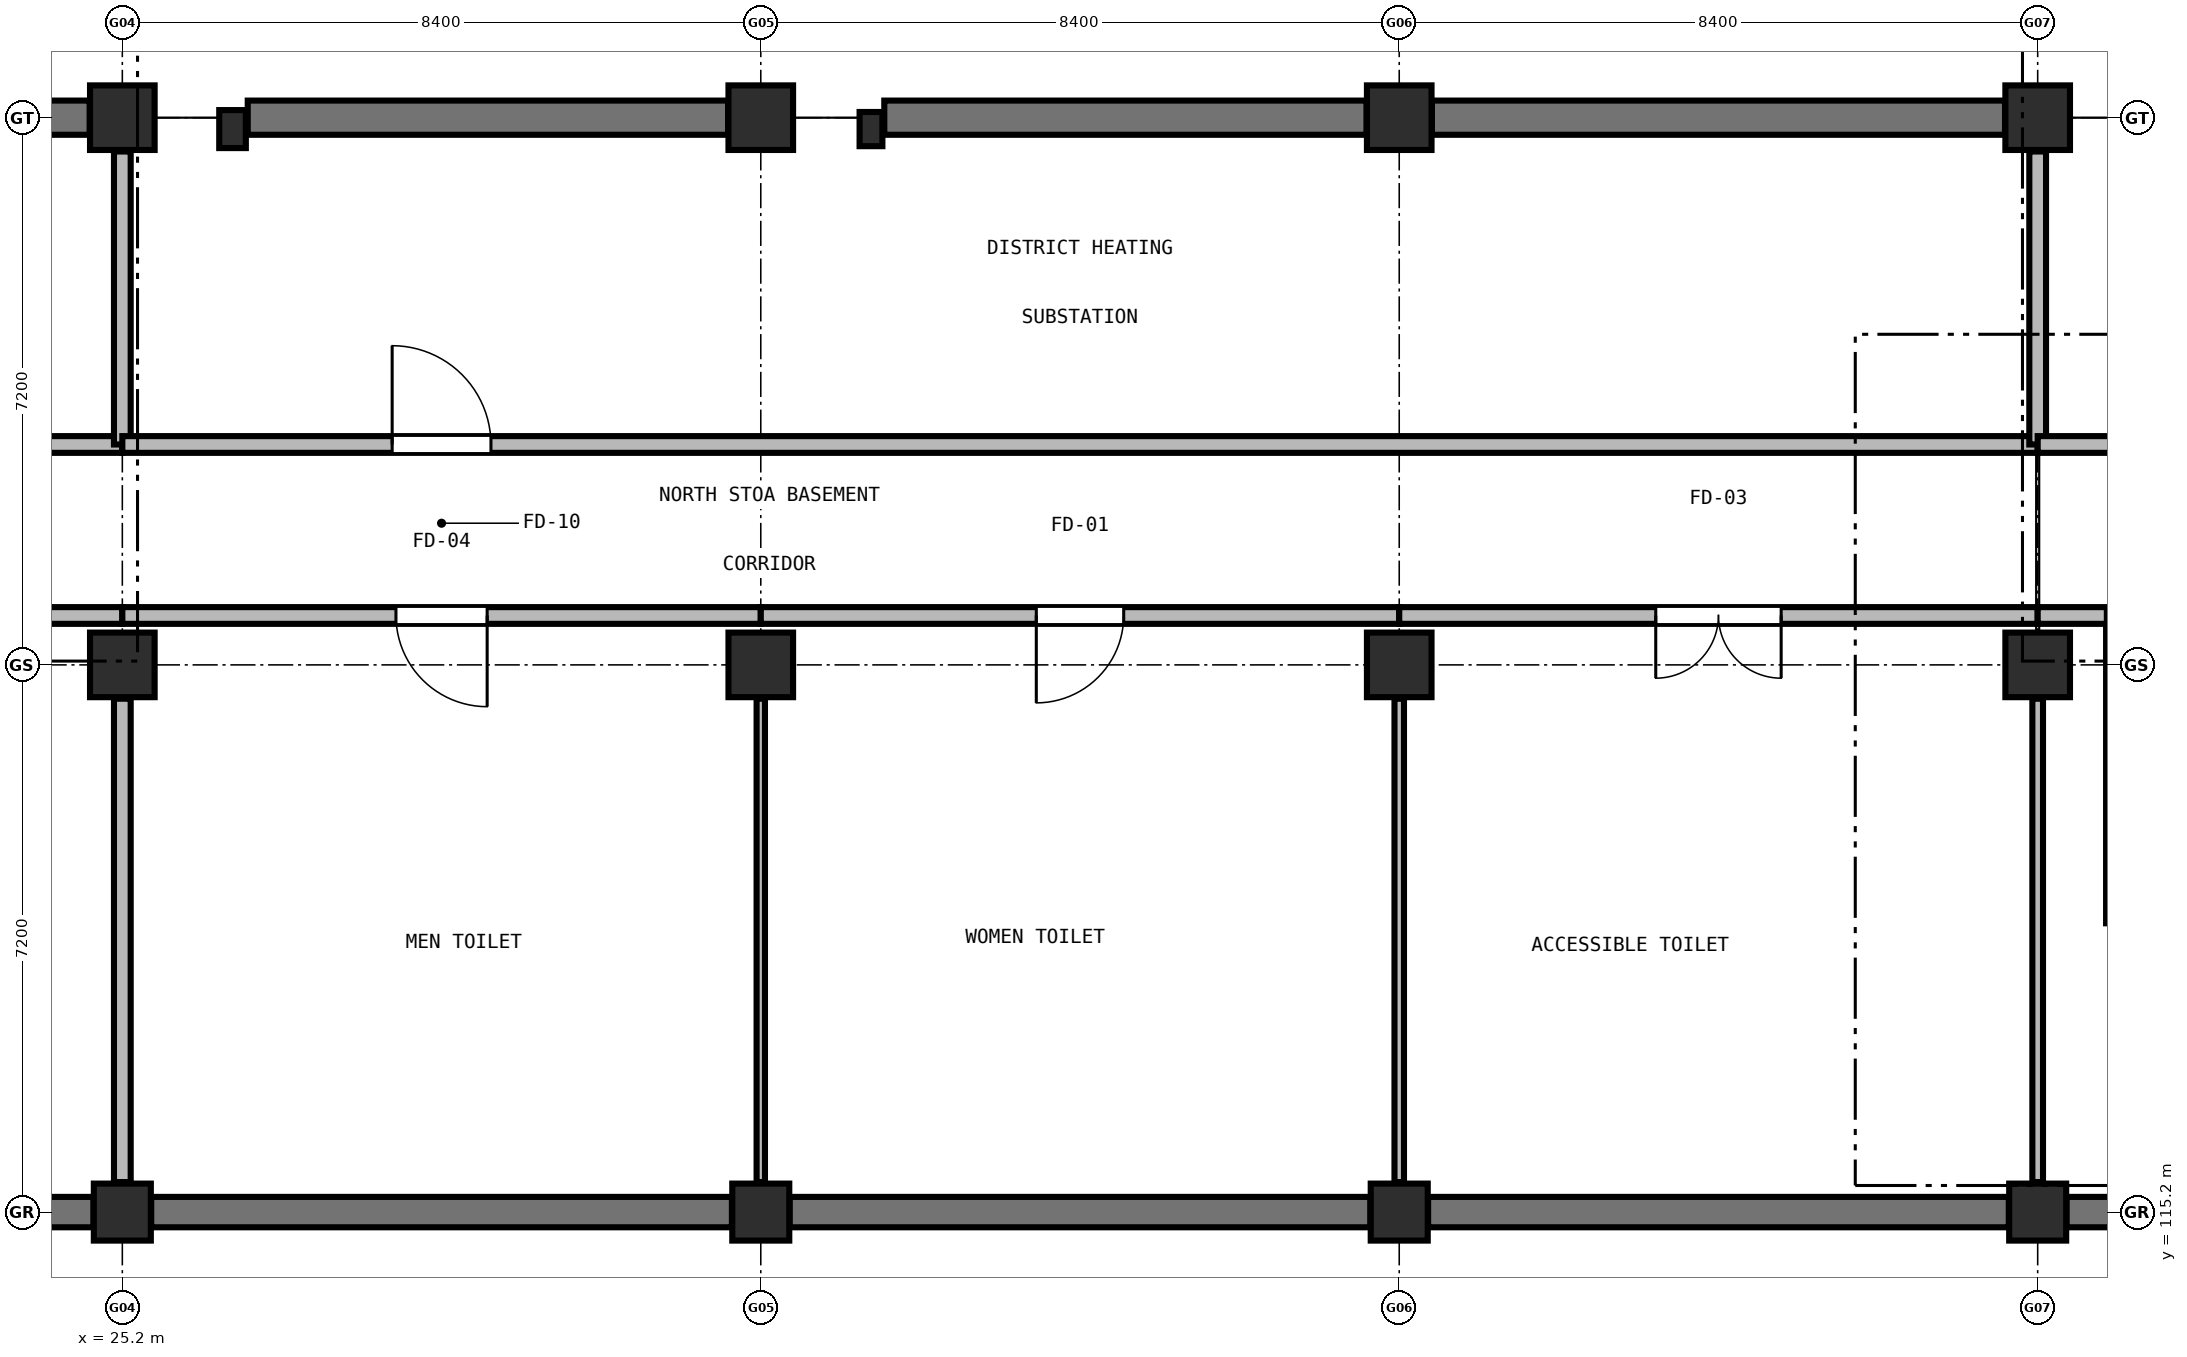
"""IFC4 building model, lengths in metres.
Left out: names, types, materials, properties, quantities, classifications, styles, units other than length and angle.
Written with IfcOpenShell. Run it as: python <this file> out.ifc"""

import sys

from ifc_helpers import new_model, si_unit, direction, frame, frame_2d, origin, origin_2d, place, context, subcontext, project, spatial, rectangle, extrude, element, fill, save


model = new_model("IFC4")
c1 = context("Model", 3, precision=1e-05, world=origin(), true_north=direction((0.0, 1.0)))
c2 = subcontext(c1, "Body", "Model", "MODEL_VIEW")
j1 = project(units=[si_unit("LENGTHUNIT", "METRE"), si_unit("PLANEANGLEUNIT", "RADIAN")], contexts=[c1])
p1 = place(None, origin())
s1 = spatial("IfcSite", under=j1, at=p1, CompositionType="ELEMENT")
p2 = place(p1, origin())
s2 = spatial("IfcBuilding", under=s1, at=p2, CompositionType="ELEMENT")
p3 = place(p2, frame((0.0, 0.0, -4.8)))
s3 = spatial("IfcBuildingStorey", under=s2, at=p3, CompositionType="ELEMENT", Elevation=-4.8)
p4 = place(p3, frame((25.2, 115.2, 0.0), z_axis=(0.0, 0.0, 1.0), x_axis=(1.0, 0.0, 0.0)))
e1 = element("IfcColumn", 1, at=p4, inside=s3, PredefinedType="COLUMN", context=c2, shape_type="SweptSolid", body=[
    extrude(rectangle(XDim=0.75, YDim=0.75, at=origin_2d()), origin(), (0.0, 0.0, 1.0), 4.8),
])
for number, where, z_axis, x_axis in (
    (2, (25.2, 122.4, 0.0), (0.0, 0.0, 1.0), (1.0, 0.0, 0.0)),
    (3, (25.2, 129.6, 0.0), (0.0, 0.0, 1.0), (1.0, 0.0, 0.0)),
):
    element("IfcColumn", number, at=place(p3, frame(where, z_axis=z_axis, x_axis=x_axis)), inside=s3, PredefinedType="COLUMN", context=c2, shape_type="SweptSolid", body=[
        extrude(rectangle(XDim=0.85, YDim=0.85, at=origin_2d()), origin(), (0.0, 0.0, 1.0), 4.8),
    ])
p5 = place(p3, frame((33.6, 115.2, 0.0), z_axis=(0.0, 0.0, 1.0), x_axis=(1.0, 0.0, 0.0)))
e4 = element("IfcColumn", 4, at=p5, inside=s3, PredefinedType="COLUMN", context=c2, shape_type="SweptSolid", body=[
    extrude(rectangle(XDim=0.75, YDim=0.75, at=origin_2d()), origin(), (0.0, 0.0, 1.0), 4.8),
])
for number, where, z_axis, x_axis in (
    (5, (33.6, 122.4, 0.0), (0.0, 0.0, 1.0), (1.0, 0.0, 0.0)),
    (6, (33.6, 129.6, 0.0), (0.0, 0.0, 1.0), (1.0, 0.0, 0.0)),
):
    element("IfcColumn", number, at=place(p3, frame(where, z_axis=z_axis, x_axis=x_axis)), inside=s3, PredefinedType="COLUMN", context=c2, shape_type="SweptSolid", body=[
        extrude(rectangle(XDim=0.85, YDim=0.85, at=origin_2d()), origin(), (0.0, 0.0, 1.0), 4.8),
    ])
p6 = place(p3, frame((42.0, 115.2, 0.0), z_axis=(0.0, 0.0, 1.0), x_axis=(1.0, 0.0, 0.0)))
e7 = element("IfcColumn", 7, at=p6, inside=s3, PredefinedType="COLUMN", context=c2, shape_type="SweptSolid", body=[
    extrude(rectangle(XDim=0.75, YDim=0.75, at=origin_2d()), origin(), (0.0, 0.0, 1.0), 4.8),
])
for number, where, z_axis, x_axis in (
    (8, (42.0, 122.4, 0.0), (0.0, 0.0, 1.0), (1.0, 0.0, 0.0)),
    (9, (42.0, 129.6, 0.0), (0.0, 0.0, 1.0), (1.0, 0.0, 0.0)),
):
    element("IfcColumn", number, at=place(p3, frame(where, z_axis=z_axis, x_axis=x_axis)), inside=s3, PredefinedType="COLUMN", context=c2, shape_type="SweptSolid", body=[
        extrude(rectangle(XDim=0.85, YDim=0.85, at=origin_2d()), origin(), (0.0, 0.0, 1.0), 4.8),
    ])
p7 = place(p3, frame((50.4, 115.2, 0.0), z_axis=(0.0, 0.0, 1.0), x_axis=(1.0, 0.0, 0.0)))
e10 = element("IfcColumn", 10, at=p7, inside=s3, PredefinedType="COLUMN", context=c2, shape_type="SweptSolid", body=[
    extrude(rectangle(XDim=0.75, YDim=0.75, at=origin_2d()), origin(), (0.0, 0.0, 1.0), 4.8),
])
for number, where, z_axis, x_axis in (
    (11, (50.4, 122.4, 0.0), (0.0, 0.0, 1.0), (1.0, 0.0, 0.0)),
    (12, (50.4, 129.6, 0.0), (0.0, 0.0, 1.0), (1.0, 0.0, 0.0)),
):
    element("IfcColumn", number, at=place(p3, frame(where, z_axis=z_axis, x_axis=x_axis)), inside=s3, PredefinedType="COLUMN", context=c2, shape_type="SweptSolid", body=[
        extrude(rectangle(XDim=0.85, YDim=0.85, at=origin_2d()), origin(), (0.0, 0.0, 1.0), 4.8),
    ])
p8 = place(p3, frame((26.65, 129.45, 0.0), z_axis=(0.0, 0.0, 1.0), x_axis=(1.0, 0.0, 0.0)))
e13 = element("IfcColumn", 13, at=p8, inside=s3, PredefinedType="PILASTER", context=c2, shape_type="SweptSolid", body=[
    extrude(rectangle(XDim=0.35, YDim=0.5, at=origin_2d()), origin(), (0.0, 0.0, 1.0), 3.85),
])
p9 = place(p3, frame((35.05, 129.45, 0.0), z_axis=(0.0, 0.0, 1.0), x_axis=(1.0, 0.0, 0.0)))
e14 = element("IfcColumn", 14, at=p9, inside=s3, PredefinedType="PILASTER", context=c2, shape_type="SweptSolid", body=[
    extrude(rectangle(XDim=0.3, YDim=0.45, at=origin_2d()), origin(), (0.0, 0.0, 1.0), 3.85),
])
p10 = place(p3, frame((17.23, 129.6, 0.0), z_axis=(0.0, 0.0, 1.0), x_axis=(1.0, 0.0, 0.0)))
e15 = element("IfcWall", 15, at=p10, inside=s3, PredefinedType="SHEAR", context=c2, shape_type="SweptSolid", body=[
    extrude(rectangle(XDim=7.54, YDim=0.45, at=frame_2d((3.77, 0.0))), origin(), (0.0, 0.0, 1.0), 3.64),
])
p11 = place(p3, frame((26.85, 129.6, 0.0), z_axis=(0.0, 0.0, 1.0), x_axis=(1.0, 0.0, 0.0)))
e16 = element("IfcWall", 16, at=p11, inside=s3, PredefinedType="SHEAR", context=c2, shape_type="SweptSolid", body=[
    extrude(rectangle(XDim=6.32, YDim=0.45, at=frame_2d((3.16, 0.0))), origin(), (0.0, 0.0, 1.0), 3.64),
])
p12 = place(p3, frame((35.225, 129.6, 0.0), z_axis=(0.0, 0.0, 1.0), x_axis=(1.0, 0.0, 0.0)))
e17 = element("IfcWall", 17, at=p12, inside=s3, PredefinedType="SHEAR", context=c2, shape_type="SweptSolid", body=[
    extrude(rectangle(XDim=6.345, YDim=0.45, at=frame_2d((3.172, 0.0))), origin(), (0.0, 0.0, 1.0), 3.64),
])
p13 = place(p3, frame((42.43, 129.6, 0.0), z_axis=(0.0, 0.0, 1.0), x_axis=(1.0, 0.0, 0.0)))
e18 = element("IfcWall", 18, at=p13, inside=s3, PredefinedType="SHEAR", context=c2, shape_type="SweptSolid", body=[
    extrude(rectangle(XDim=7.54, YDim=0.45, at=frame_2d((3.77, 0.0))), origin(), (0.0, 0.0, 1.0), 3.64),
])
p14 = place(p3, frame((17.18, 115.2, 0.0), z_axis=(0.0, 0.0, 1.0), x_axis=(1.0, 0.0, 0.0)))
e19 = element("IfcWall", 19, at=p14, inside=s3, PredefinedType="SHEAR", context=c2, shape_type="SweptSolid", body=[
    extrude(rectangle(XDim=7.64, YDim=0.4, at=frame_2d((3.82, 0.0))), origin(), (0.0, 0.0, 1.0), 3.64),
])
p15 = place(p3, frame((25.58, 115.2, 0.0), z_axis=(0.0, 0.0, 1.0), x_axis=(1.0, 0.0, 0.0)))
e20 = element("IfcWall", 20, at=p15, inside=s3, PredefinedType="SHEAR", context=c2, shape_type="SweptSolid", body=[
    extrude(rectangle(XDim=7.64, YDim=0.4, at=frame_2d((3.82, 0.0))), origin(), (0.0, 0.0, 1.0), 3.64),
])
for number, where, z_axis, x_axis in (
    (21, (33.98, 115.2, 0.0), (0.0, 0.0, 1.0), (1.0, 0.0, 0.0)),
    (22, (42.38, 115.2, 0.0), (0.0, 0.0, 1.0), (1.0, 0.0, 0.0)),
):
    element("IfcWall", number, at=place(p3, frame(where, z_axis=z_axis, x_axis=x_axis)), inside=s3, PredefinedType="SHEAR", context=c2, shape_type="SweptSolid", body=[
        extrude(rectangle(XDim=7.64, YDim=0.4, at=frame_2d((3.82, 0.0))), origin(), (0.0, 0.0, 1.0), 3.64),
    ])
p16 = place(p3, frame((50.78, 115.2, 0.0), z_axis=(0.0, 0.0, 1.0), x_axis=(1.0, 0.0, 0.0)))
e23 = element("IfcWall", 23, at=p16, inside=s3, PredefinedType="SHEAR", context=c2, shape_type="SweptSolid", body=[
    extrude(rectangle(XDim=7.64, YDim=0.4, at=frame_2d((3.82, 0.0))), origin(), (0.0, 0.0, 1.0), 3.64),
])
p17 = place(p3, frame((51.45, 119.0, 0.0), z_axis=(0.0, 0.0, 1.0), x_axis=(0.0, 1.0, 0.0)))
e24 = element("IfcWall", 24, at=p17, inside=s3, PredefinedType="SHEAR", context=c2, shape_type="SweptSolid", body=[
    extrude(rectangle(XDim=4.1, YDim=0.3, at=frame_2d((2.05, 0.0))), origin(), (0.0, 0.0, 1.0), 4.5),
])
p18 = place(p3, frame((22.47, 125.3, 0.0), z_axis=(0.0, 0.0, 1.0), x_axis=(1.0, 0.0, 0.0)))
e25 = element("IfcWall", 25, at=p18, inside=s3, PredefinedType="SOLIDWALL", context=c2, shape_type="SweptSolid", body=[
    extrude(rectangle(XDim=2.73, YDim=0.22, at=frame_2d((1.365, 0.0))), origin(), (0.0, 0.0, 1.0), 3.785),
])
p19 = place(p3, frame((25.2, 125.3, 0.0), z_axis=(0.0, 0.0, 1.0), x_axis=(0.0, 1.0, 0.0)))
e26 = element("IfcWall", 26, at=p19, inside=s3, PredefinedType="SOLIDWALL", context=c2, shape_type="SweptSolid", body=[
    extrude(rectangle(XDim=3.855, YDim=0.22, at=frame_2d((1.927, 0.0))), origin(), (0.0, 0.0, 1.0), 3.635),
])
p20 = place(p3, frame((25.2, 125.3, 0.0), z_axis=(0.0, 0.0, 1.0), x_axis=(1.0, 0.0, 0.0)))
e27 = element("IfcWall", 27, at=p20, inside=s3, PredefinedType="SOLIDWALL", context=c2, shape_type="SweptSolid", body=[
    extrude(rectangle(XDim=25.2, YDim=0.22, at=frame_2d((12.6, 0.0))), origin(), (0.0, 0.0, 1.0), 3.785),
])
p21 = place(p20, frame((3.55, 0.0, 0.0)))
e28 = element("IfcOpeningElement", 28, at=p21, cuts=e27, PredefinedType="OPENING", context=c2, shape_type="SweptSolid", body=[
    extrude(rectangle(XDim=1.3, YDim=2.15, at=frame_2d((0.65, 1.075))), frame((0.0, 0.12, 0.0), z_axis=(0.0, -1.0, 0.0), x_axis=(1.0, 0.0, 0.0)), (0.0, 0.0, 1.0), 0.24),
])
p22 = place(p3, frame((50.4, 125.3, 0.0), z_axis=(0.0, 0.0, 1.0), x_axis=(0.0, 1.0, 0.0)))
e29 = element("IfcWall", 29, at=p22, inside=s3, PredefinedType="SOLIDWALL", context=c2, shape_type="SweptSolid", body=[
    extrude(rectangle(XDim=3.855, YDim=0.22, at=frame_2d((1.927, 0.0))), origin(), (0.0, 0.0, 1.0), 3.635),
])
p23 = place(p3, frame((50.4, 125.3, 0.0), z_axis=(0.0, 0.0, 1.0), x_axis=(1.0, 0.0, 0.0)))
e30 = element("IfcWall", 30, at=p23, inside=s3, PredefinedType="SOLIDWALL", context=c2, shape_type="SweptSolid", body=[
    extrude(rectangle(XDim=2.73, YDim=0.22, at=frame_2d((1.365, 0.0))), origin(), (0.0, 0.0, 1.0), 3.785),
])
p24 = place(p23, frame((1.23, 0.0, 0.0)))
e31 = element("IfcOpeningElement", 31, at=p24, cuts=e30, PredefinedType="OPENING", context=c2, shape_type="SweptSolid", body=[
    extrude(rectangle(XDim=1.05, YDim=2.15, at=frame_2d((0.525, 1.075))), frame((0.0, 0.12, 0.0), z_axis=(0.0, -1.0, 0.0), x_axis=(1.0, 0.0, 0.0)), (0.0, 0.0, 1.0), 0.24),
])
p25 = place(p3, frame((25.2, 123.05, 0.0), z_axis=(0.0, 0.0, 1.0), x_axis=(-1.0, 0.0, 0.0)))
e32 = element("IfcWall", 32, at=p25, inside=s3, PredefinedType="SOLIDWALL", context=c2, shape_type="SweptSolid", body=[
    extrude(rectangle(XDim=6.11, YDim=0.22, at=frame_2d((3.055, 0.0))), origin(), (0.0, 0.0, 1.0), 3.785),
])
p26 = place(p3, frame((25.2, 115.595, 0.0), z_axis=(0.0, 0.0, 1.0), x_axis=(0.0, 1.0, 0.0)))
e33 = element("IfcWall", 33, at=p26, inside=s3, PredefinedType="SOLIDWALL", context=c2, shape_type="SweptSolid", body=[
    extrude(rectangle(XDim=6.36, YDim=0.22, at=frame_2d((3.18, 0.0))), origin(), (0.0, 0.0, 1.0), 3.635),
])
p27 = place(p3, frame((33.6, 123.05, 0.0), z_axis=(0.0, 0.0, 1.0), x_axis=(-1.0, 0.0, 0.0)))
e34 = element("IfcWall", 34, at=p27, inside=s3, PredefinedType="SOLIDWALL", context=c2, shape_type="SweptSolid", body=[
    extrude(rectangle(XDim=8.4, YDim=0.22, at=frame_2d((4.2, 0.0))), origin(), (0.0, 0.0, 1.0), 3.785),
])
p28 = place(p27, frame((3.6, 0.0, 0.0)))
e35 = element("IfcOpeningElement", 35, at=p28, cuts=e34, PredefinedType="OPENING", context=c2, shape_type="SweptSolid", body=[
    extrude(rectangle(XDim=1.2, YDim=2.15, at=frame_2d((0.6, 1.075))), frame((0.0, 0.12, 0.0), z_axis=(0.0, -1.0, 0.0), x_axis=(1.0, 0.0, 0.0)), (0.0, 0.0, 1.0), 0.24),
])
p29 = place(p3, frame((33.6, 115.595, 0.0), z_axis=(0.0, 0.0, 1.0), x_axis=(0.0, 1.0, 0.0)))
e36 = element("IfcWall", 36, at=p29, inside=s3, PredefinedType="PARTITIONING", context=c2, shape_type="SweptSolid", body=[
    extrude(rectangle(XDim=6.36, YDim=0.11, at=frame_2d((3.18, 0.0))), origin(), (0.0, 0.0, 1.0), 3.635),
])
p30 = place(p3, frame((42.0, 123.05, 0.0), z_axis=(0.0, 0.0, 1.0), x_axis=(-1.0, 0.0, 0.0)))
e37 = element("IfcWall", 37, at=p30, inside=s3, PredefinedType="SOLIDWALL", context=c2, shape_type="SweptSolid", body=[
    extrude(rectangle(XDim=8.4, YDim=0.22, at=frame_2d((4.2, 0.0))), origin(), (0.0, 0.0, 1.0), 3.785),
])
p31 = place(p30, frame((3.625, 0.0, 0.0)))
e38 = element("IfcOpeningElement", 38, at=p31, cuts=e37, PredefinedType="OPENING", context=c2, shape_type="SweptSolid", body=[
    extrude(rectangle(XDim=1.15, YDim=2.15, at=frame_2d((0.575, 1.075))), frame((0.0, 0.12, 0.0), z_axis=(0.0, -1.0, 0.0), x_axis=(1.0, 0.0, 0.0)), (0.0, 0.0, 1.0), 0.24),
])
p32 = place(p3, frame((42.0, 115.595, 0.0), z_axis=(0.0, 0.0, 1.0), x_axis=(0.0, 1.0, 0.0)))
e39 = element("IfcWall", 39, at=p32, inside=s3, PredefinedType="PARTITIONING", context=c2, shape_type="SweptSolid", body=[
    extrude(rectangle(XDim=6.36, YDim=0.125, at=frame_2d((3.18, 0.0))), origin(), (0.0, 0.0, 1.0), 3.635),
])
p33 = place(p3, frame((50.4, 123.05, 0.0), z_axis=(0.0, 0.0, 1.0), x_axis=(-1.0, 0.0, 0.0)))
e40 = element("IfcWall", 40, at=p33, inside=s3, PredefinedType="SOLIDWALL", context=c2, shape_type="SweptSolid", body=[
    extrude(rectangle(XDim=8.4, YDim=0.22, at=frame_2d((4.2, 0.0))), origin(), (0.0, 0.0, 1.0), 3.785),
])
p34 = place(p33, frame((3.375, 0.0, 0.0)))
e41 = element("IfcOpeningElement", 41, at=p34, cuts=e40, PredefinedType="OPENING", context=c2, shape_type="SweptSolid", body=[
    extrude(rectangle(XDim=1.65, YDim=2.2, at=frame_2d((0.825, 1.1))), frame((0.0, 0.12, 0.0), z_axis=(0.0, -1.0, 0.0), x_axis=(1.0, 0.0, 0.0)), (0.0, 0.0, 1.0), 0.24),
])
p35 = place(p3, frame((50.4, 115.595, 0.0), z_axis=(0.0, 0.0, 1.0), x_axis=(0.0, 1.0, 0.0)))
e42 = element("IfcWall", 42, at=p35, inside=s3, PredefinedType="PARTITIONING", context=c2, shape_type="SweptSolid", body=[
    extrude(rectangle(XDim=6.36, YDim=0.14, at=frame_2d((3.18, 0.0))), origin(), (0.0, 0.0, 1.0), 3.635),
])
p36 = place(p3, frame((51.31, 123.05, 0.0), z_axis=(0.0, 0.0, 1.0), x_axis=(-1.0, 0.0, 0.0)))
e43 = element("IfcWall", 43, at=p36, inside=s3, PredefinedType="SOLIDWALL", context=c2, shape_type="SweptSolid", body=[
    extrude(rectangle(XDim=0.91, YDim=0.22, at=frame_2d((0.455, 0.0))), origin(), (0.0, 0.0, 1.0), 3.785),
])
p37 = place(p21, origin())
e44 = element("IfcDoor", 44, at=p37, inside=s3, OperationType="SINGLE_SWING_LEFT", PredefinedType="DOOR", context=c2, shape_type="SweptSolid", body=[
    extrude(rectangle(XDim=1.3, YDim=2.15, at=frame_2d((0.65, 1.075))), frame((0.0, 0.025, 0.0), z_axis=(0.0, -1.0, 0.0), x_axis=(1.0, 0.0, 0.0)), (0.0, 0.0, 1.0), 0.05),
])
fill(e28, e44)
p38 = place(p28, origin())
e45 = element("IfcDoor", 45, at=p38, inside=s3, OperationType="SINGLE_SWING_LEFT", PredefinedType="DOOR", context=c2, shape_type="SweptSolid", body=[
    extrude(rectangle(XDim=1.2, YDim=2.15, at=frame_2d((0.6, 1.075))), frame((0.0, 0.025, 0.0), z_axis=(0.0, -1.0, 0.0), x_axis=(1.0, 0.0, 0.0)), (0.0, 0.0, 1.0), 0.05),
])
fill(e35, e45)
p39 = place(p31, origin())
e46 = element("IfcDoor", 46, at=p39, inside=s3, OperationType="SINGLE_SWING_RIGHT", PredefinedType="DOOR", context=c2, shape_type="SweptSolid", body=[
    extrude(rectangle(XDim=1.15, YDim=2.15, at=frame_2d((0.575, 1.075))), frame((0.0, 0.025, 0.0), z_axis=(0.0, -1.0, 0.0), x_axis=(1.0, 0.0, 0.0)), (0.0, 0.0, 1.0), 0.05),
])
fill(e38, e46)
p40 = place(p34, origin())
e47 = element("IfcDoor", 47, at=p40, inside=s3, OperationType="DOUBLE_DOOR_SINGLE_SWING", PredefinedType="DOOR", context=c2, shape_type="SweptSolid", body=[
    extrude(rectangle(XDim=1.65, YDim=2.2, at=frame_2d((0.825, 1.1))), frame((0.0, 0.025, 0.0), z_axis=(0.0, -1.0, 0.0), x_axis=(1.0, 0.0, 0.0)), (0.0, 0.0, 1.0), 0.05),
])
fill(e41, e47)
save(model, sys.argv[1])
